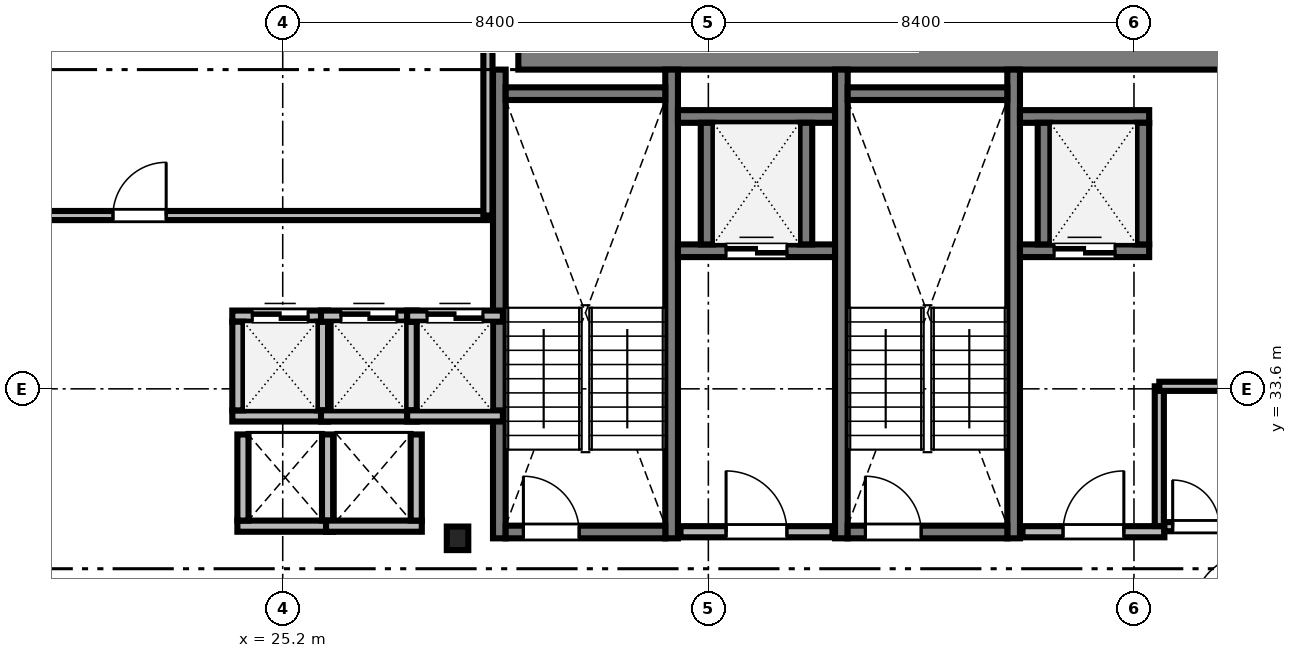
"""IFC4 building model, lengths in metres.
Left out: names, types, materials, properties, quantities, classifications, styles, units other than length and angle.
Written with IfcOpenShell. Run it as: python <this file> out.ifc"""

import sys

from ifc_helpers import new_model, si_unit, direction, frame, frame_2d, origin, origin_2d, place, context, subcontext, project, spatial, rectangle, i_section, extrude, source, transform, mapped, element, fill, save


model = new_model("IFC4")
c1 = context("Model", 3, precision=1e-05, world=origin(), true_north=direction((0.0, 1.0)))
c2 = subcontext(c1, "Body", "Model", "MODEL_VIEW")
j1 = project(units=[si_unit("LENGTHUNIT", "METRE"), si_unit("PLANEANGLEUNIT", "RADIAN")], contexts=[c1])
p1 = place(None, origin())
s1 = spatial("IfcSite", under=j1, at=p1, CompositionType="ELEMENT")
p2 = place(p1, origin())
s2 = spatial("IfcBuilding", under=s1, at=p2, CompositionType="ELEMENT")
p3 = place(p2, frame((0.0, 0.0, 129.8)))
s3 = spatial("IfcBuildingStorey", under=s2, at=p3, CompositionType="ELEMENT", Elevation=129.8)
m1 = source(origin(), c2, "Body", "SweptSolid", [
    extrude(rectangle(XDim=17.52, YDim=0.8, at=frame_2d((8.76, 0.0))), origin(), (0.0, 0.0, 1.0), 3.46),
])
p4 = place(p3, frame((29.85, 40.3, 0.0), z_axis=(0.0, 0.0, 1.0), x_axis=(1.0, 0.0, 0.0)))
e1 = element("IfcWall", 1, at=p4, inside=s3, PredefinedType="SHEAR", context=c2, shape_type="MappedRepresentation", body=[
    mapped(m1, transform((0.0, 0.0, 0.0), scale=1.0)),
])
m2 = source(origin(), c2, "Body", "SweptSolid", [
    extrude(i_section(OverallWidth=0.424, OverallDepth=0.465, WebThickness=0.035, FlangeThickness=0.056, FilletRadius=0.015, at=origin_2d()), origin(), (0.0, 0.0, 1.0), 3.46),
])
p5 = place(p3, frame((28.65, 30.65, 0.0), z_axis=(0.0, 0.0, 1.0), x_axis=(1.0, 0.0, 0.0)))
e2 = element("IfcColumn", 2, at=p5, inside=s3, PredefinedType="COLUMN", context=c2, shape_type="MappedRepresentation", body=[
    mapped(m2, transform((0.0, 0.0, 0.0), scale=1.0)),
])
m3 = source(origin(), c2, "Body", "SweptSolid", [
    extrude(rectangle(XDim=9.25, YDim=0.25, at=frame_2d((4.625, 0.0))), origin(), (0.0, 0.0, 1.0), 3.5),
])
for number, where, z_axis, x_axis in (
    (3, (29.475, 30.65, 0.0), (0.0, 0.0, 1.0), (0.0, 1.0, 0.0)),
    (4, (32.875, 30.65, 0.0), (0.0, 0.0, 1.0), (0.0, 1.0, 0.0)),
):
    element("IfcWall", number, at=place(p3, frame(where, z_axis=z_axis, x_axis=x_axis)), inside=s3, PredefinedType="SOLIDWALL", context=c2, shape_type="MappedRepresentation", body=[
        mapped(m3, transform((0.0, 0.0, 0.0), scale=1.0)),
    ])
m4 = source(origin(), c2, "Body", "SweptSolid", [
    extrude(rectangle(XDim=3.15, YDim=0.25, at=frame_2d((1.575, 0.0))), origin(), (0.0, 0.0, 1.0), 3.5),
])
p6 = place(p3, frame((29.6, 39.425, 0.0), z_axis=(0.0, 0.0, 1.0), x_axis=(1.0, 0.0, 0.0)))
e5 = element("IfcWall", 5, at=p6, inside=s3, PredefinedType="SOLIDWALL", context=c2, shape_type="MappedRepresentation", body=[
    mapped(m4, transform((0.0, 0.0, 0.0), scale=1.0)),
])
p7 = place(p3, frame((29.6, 30.775, 0.0), z_axis=(0.0, 0.0, 1.0), x_axis=(1.0, 0.0, 0.0)))
e6 = element("IfcWall", 6, at=p7, inside=s3, PredefinedType="SOLIDWALL", context=c2, shape_type="MappedRepresentation", body=[
    mapped(m4, transform((0.0, 0.0, 0.0), scale=1.0)),
])
m5 = source(origin(), c2, "Body", "SweptSolid", [
    extrude(rectangle(XDim=1.1, YDim=2.2, at=frame_2d((0.55, 1.1))), frame((0.0, 0.135, 0.0), z_axis=(0.0, -1.0, 0.0), x_axis=(1.0, 0.0, 0.0)), (0.0, 0.0, 1.0), 0.27),
])
p8 = place(p7, frame((0.35, 0.0, 0.0)))
e7 = element("IfcOpeningElement", 7, at=p8, cuts=e6, PredefinedType="OPENING", context=c2, shape_type="MappedRepresentation", body=[
    mapped(m5, transform((0.0, 0.0, 0.0), scale=1.0)),
])
for number, where, z_axis, x_axis in (
    (8, (36.225, 30.65, 0.0), (0.0, 0.0, 1.0), (0.0, 1.0, 0.0)),
    (9, (39.625, 30.65, 0.0), (0.0, 0.0, 1.0), (0.0, 1.0, 0.0)),
):
    element("IfcWall", number, at=place(p3, frame(where, z_axis=z_axis, x_axis=x_axis)), inside=s3, PredefinedType="SOLIDWALL", context=c2, shape_type="MappedRepresentation", body=[
        mapped(m3, transform((0.0, 0.0, 0.0), scale=1.0)),
    ])
p9 = place(p3, frame((36.35, 39.425, 0.0), z_axis=(0.0, 0.0, 1.0), x_axis=(1.0, 0.0, 0.0)))
e10 = element("IfcWall", 10, at=p9, inside=s3, PredefinedType="SOLIDWALL", context=c2, shape_type="MappedRepresentation", body=[
    mapped(m4, transform((0.0, 0.0, 0.0), scale=1.0)),
])
p10 = place(p3, frame((36.35, 30.775, 0.0), z_axis=(0.0, 0.0, 1.0), x_axis=(1.0, 0.0, 0.0)))
e11 = element("IfcWall", 11, at=p10, inside=s3, PredefinedType="SOLIDWALL", context=c2, shape_type="MappedRepresentation", body=[
    mapped(m4, transform((0.0, 0.0, 0.0), scale=1.0)),
])
p11 = place(p10, frame((0.35, 0.0, 0.0)))
e12 = element("IfcOpeningElement", 12, at=p11, cuts=e11, PredefinedType="OPENING", context=c2, shape_type="MappedRepresentation", body=[
    mapped(m5, transform((0.0, 0.0, 0.0), scale=1.0)),
])
m6 = source(origin(), c2, "Body", "SweptSolid", [
    extrude(rectangle(XDim=3.0, YDim=0.22, at=frame_2d((1.5, 0.0))), origin(), (0.0, 0.0, 1.0), 3.46),
])
p12 = place(p3, frame((33.05, 30.78, 0.0), z_axis=(0.0, 0.0, 1.0), x_axis=(1.0, 0.0, 0.0)))
e13 = element("IfcWall", 13, at=p12, inside=s3, PredefinedType="SOLIDWALL", context=c2, shape_type="MappedRepresentation", body=[
    mapped(m6, transform((0.0, 0.0, 0.0), scale=1.0)),
])
m7 = source(origin(), c2, "Body", "SweptSolid", [
    extrude(rectangle(XDim=1.2, YDim=2.2, at=frame_2d((0.6, 1.1))), frame((0.0, 0.12, 0.0), z_axis=(0.0, -1.0, 0.0), x_axis=(1.0, 0.0, 0.0)), (0.0, 0.0, 1.0), 0.24),
])
p13 = place(p12, frame((0.9, 0.0, 0.0)))
e14 = element("IfcOpeningElement", 14, at=p13, cuts=e13, PredefinedType="OPENING", context=c2, shape_type="MappedRepresentation", body=[
    mapped(m7, transform((0.0, 0.0, 0.0), scale=1.0)),
])
m8 = source(origin(), c2, "Body", "SweptSolid", [
    extrude(rectangle(XDim=2.8, YDim=0.22, at=frame_2d((1.4, 0.0))), origin(), (0.0, 0.0, 1.0), 3.46),
])
p14 = place(p3, frame((39.8, 30.78, 0.0), z_axis=(0.0, 0.0, 1.0), x_axis=(1.0, 0.0, 0.0)))
e15 = element("IfcWall", 15, at=p14, inside=s3, PredefinedType="SOLIDWALL", context=c2, shape_type="MappedRepresentation", body=[
    mapped(m8, transform((0.0, 0.0, 0.0), scale=1.0)),
])
p15 = place(p14, frame((0.8, 0.0, 0.0)))
e16 = element("IfcOpeningElement", 16, at=p15, cuts=e15, PredefinedType="OPENING", context=c2, shape_type="MappedRepresentation", body=[
    mapped(m7, transform((0.0, 0.0, 0.0), scale=1.0)),
])
m9 = source(origin(), c2, "Body", "SweptSolid", [
    extrude(rectangle(XDim=1.89, YDim=0.22, at=frame_2d((0.945, 0.0))), origin(), (0.0, 0.0, 1.0), 3.46),
])
p16 = place(p3, frame((24.205, 33.065, 0.0), z_axis=(0.0, 0.0, 1.0), x_axis=(1.0, 0.0, 0.0)))
e17 = element("IfcWall", 17, at=p16, inside=s3, PredefinedType="SOLIDWALL", context=c2, shape_type="MappedRepresentation", body=[
    mapped(m9, transform((0.0, 0.0, 0.0), scale=1.0)),
])
p17 = place(p3, frame((24.205, 35.035, 0.0), z_axis=(0.0, 0.0, 1.0), x_axis=(1.0, 0.0, 0.0)))
e18 = element("IfcWall", 18, at=p17, inside=s3, PredefinedType="SOLIDWALL", context=c2, shape_type="MappedRepresentation", body=[
    mapped(m9, transform((0.0, 0.0, 0.0), scale=1.0)),
])
m10 = source(origin(), c2, "Body", "SweptSolid", [
    extrude(rectangle(XDim=1.1, YDim=2.2, at=frame_2d((0.55, 1.1))), frame((0.0, 0.12, 0.0), z_axis=(0.0, -1.0, 0.0), x_axis=(1.0, 0.0, 0.0)), (0.0, 0.0, 1.0), 0.24),
])
p18 = place(p17, frame((0.395, 0.0, 0.0)))
e19 = element("IfcOpeningElement", 19, at=p18, cuts=e18, PredefinedType="OPENING", context=c2, shape_type="MappedRepresentation", body=[
    mapped(m10, transform((0.0, 0.0, 0.0), scale=1.0)),
])
m11 = source(origin(), c2, "Body", "SweptSolid", [
    extrude(rectangle(XDim=1.75, YDim=0.22, at=frame_2d((0.875, 0.0))), origin(), (0.0, 0.0, 1.0), 3.46),
])
for number, where, z_axis, x_axis in (
    (20, (24.315, 33.175, 0.0), (0.0, 0.0, 1.0), (0.0, 1.0, 0.0)),
    (21, (25.985, 33.175, 0.0), (0.0, 0.0, 1.0), (0.0, 1.0, 0.0)),
):
    element("IfcWall", number, at=place(p3, frame(where, z_axis=z_axis, x_axis=x_axis)), inside=s3, PredefinedType="SOLIDWALL", context=c2, shape_type="MappedRepresentation", body=[
        mapped(m11, transform((0.0, 0.0, 0.0), scale=1.0)),
    ])
p19 = place(p3, frame((25.955, 33.065, 0.0), z_axis=(0.0, 0.0, 1.0), x_axis=(1.0, 0.0, 0.0)))
e22 = element("IfcWall", 22, at=p19, inside=s3, PredefinedType="SOLIDWALL", context=c2, shape_type="MappedRepresentation", body=[
    mapped(m9, transform((0.0, 0.0, 0.0), scale=1.0)),
])
p20 = place(p3, frame((25.955, 35.035, 0.0), z_axis=(0.0, 0.0, 1.0), x_axis=(1.0, 0.0, 0.0)))
e23 = element("IfcWall", 23, at=p20, inside=s3, PredefinedType="SOLIDWALL", context=c2, shape_type="MappedRepresentation", body=[
    mapped(m9, transform((0.0, 0.0, 0.0), scale=1.0)),
])
p21 = place(p20, frame((0.395, 0.0, 0.0)))
e24 = element("IfcOpeningElement", 24, at=p21, cuts=e23, PredefinedType="OPENING", context=c2, shape_type="MappedRepresentation", body=[
    mapped(m10, transform((0.0, 0.0, 0.0), scale=1.0)),
])
p22 = place(p3, frame((27.735, 33.175, 0.0), z_axis=(0.0, 0.0, 1.0), x_axis=(0.0, 1.0, 0.0)))
e25 = element("IfcWall", 25, at=p22, inside=s3, PredefinedType="SOLIDWALL", context=c2, shape_type="MappedRepresentation", body=[
    mapped(m11, transform((0.0, 0.0, 0.0), scale=1.0)),
])
p23 = place(p3, frame((27.655, 33.065, 0.0), z_axis=(0.0, 0.0, 1.0), x_axis=(1.0, 0.0, 0.0)))
e26 = element("IfcWall", 26, at=p23, inside=s3, PredefinedType="SOLIDWALL", context=c2, shape_type="MappedRepresentation", body=[
    mapped(m9, transform((0.0, 0.0, 0.0), scale=1.0)),
])
p24 = place(p3, frame((27.655, 35.035, 0.0), z_axis=(0.0, 0.0, 1.0), x_axis=(1.0, 0.0, 0.0)))
e27 = element("IfcWall", 27, at=p24, inside=s3, PredefinedType="SOLIDWALL", context=c2, shape_type="MappedRepresentation", body=[
    mapped(m9, transform((0.0, 0.0, 0.0), scale=1.0)),
])
p25 = place(p24, frame((0.395, 0.0, 0.0)))
e28 = element("IfcOpeningElement", 28, at=p25, cuts=e27, PredefinedType="OPENING", context=c2, shape_type="MappedRepresentation", body=[
    mapped(m10, transform((0.0, 0.0, 0.0), scale=1.0)),
])
m12 = source(origin(), c2, "Body", "SweptSolid", [
    extrude(rectangle(XDim=3.1, YDim=0.25, at=frame_2d((1.55, 0.0))), origin(), (0.0, 0.0, 1.0), 3.46),
])
p26 = place(p3, frame((33.0, 36.325, 0.0), z_axis=(0.0, 0.0, 1.0), x_axis=(1.0, 0.0, 0.0)))
e29 = element("IfcWall", 29, at=p26, inside=s3, PredefinedType="SOLIDWALL", context=c2, shape_type="MappedRepresentation", body=[
    mapped(m12, transform((0.0, 0.0, 0.0), scale=1.0)),
])
m13 = source(origin(), c2, "Body", "SweptSolid", [
    extrude(rectangle(XDim=1.2, YDim=2.25, at=frame_2d((0.6, 1.125))), frame((0.0, 0.135, 0.0), z_axis=(0.0, -1.0, 0.0), x_axis=(1.0, 0.0, 0.0)), (0.0, 0.0, 1.0), 0.27),
])
p27 = place(p26, frame((0.95, 0.0, 0.0)))
e30 = element("IfcOpeningElement", 30, at=p27, cuts=e29, PredefinedType="OPENING", context=c2, shape_type="MappedRepresentation", body=[
    mapped(m13, transform((0.0, 0.0, 0.0), scale=1.0)),
])
p28 = place(p3, frame((33.0, 38.975, 0.0), z_axis=(0.0, 0.0, 1.0), x_axis=(1.0, 0.0, 0.0)))
e31 = element("IfcWall", 31, at=p28, inside=s3, PredefinedType="SOLIDWALL", context=c2, shape_type="MappedRepresentation", body=[
    mapped(m12, transform((0.0, 0.0, 0.0), scale=1.0)),
])
m14 = source(origin(), c2, "Body", "SweptSolid", [
    extrude(rectangle(XDim=2.4, YDim=0.25, at=frame_2d((1.2, 0.0))), origin(), (0.0, 0.0, 1.0), 3.46),
])
for number, where, z_axis, x_axis in (
    (32, (33.575, 36.45, 0.0), (0.0, 0.0, 1.0), (0.0, 1.0, 0.0)),
    (33, (35.525, 36.45, 0.0), (0.0, 0.0, 1.0), (0.0, 1.0, 0.0)),
):
    element("IfcWall", number, at=place(p3, frame(where, z_axis=z_axis, x_axis=x_axis)), inside=s3, PredefinedType="SOLIDWALL", context=c2, shape_type="MappedRepresentation", body=[
        mapped(m14, transform((0.0, 0.0, 0.0), scale=1.0)),
    ])
m15 = source(origin(), c2, "Body", "SweptSolid", [
    extrude(rectangle(XDim=2.55, YDim=0.25, at=frame_2d((1.275, 0.0))), origin(), (0.0, 0.0, 1.0), 3.46),
])
p29 = place(p3, frame((39.75, 36.325, 0.0), z_axis=(0.0, 0.0, 1.0), x_axis=(1.0, 0.0, 0.0)))
e34 = element("IfcWall", 34, at=p29, inside=s3, PredefinedType="SOLIDWALL", context=c2, shape_type="MappedRepresentation", body=[
    mapped(m15, transform((0.0, 0.0, 0.0), scale=1.0)),
])
p30 = place(p29, frame((0.675, 0.0, 0.0)))
e35 = element("IfcOpeningElement", 35, at=p30, cuts=e34, PredefinedType="OPENING", context=c2, shape_type="MappedRepresentation", body=[
    mapped(m13, transform((0.0, 0.0, 0.0), scale=1.0)),
])
p31 = place(p3, frame((39.75, 38.975, 0.0), z_axis=(0.0, 0.0, 1.0), x_axis=(1.0, 0.0, 0.0)))
e36 = element("IfcWall", 36, at=p31, inside=s3, PredefinedType="SOLIDWALL", context=c2, shape_type="MappedRepresentation", body=[
    mapped(m15, transform((0.0, 0.0, 0.0), scale=1.0)),
])
for number, where, z_axis, x_axis in (
    (37, (40.225, 36.45, 0.0), (0.0, 0.0, 1.0), (0.0, 1.0, 0.0)),
    (38, (42.175, 36.45, 0.0), (0.0, 0.0, 1.0), (0.0, 1.0, 0.0)),
):
    element("IfcWall", number, at=place(p3, frame(where, z_axis=z_axis, x_axis=x_axis)), inside=s3, PredefinedType="SOLIDWALL", context=c2, shape_type="MappedRepresentation", body=[
        mapped(m14, transform((0.0, 0.0, 0.0), scale=1.0)),
    ])
m16 = source(origin(), c2, "Body", "SweptSolid", [
    extrude(rectangle(XDim=1.89, YDim=0.22, at=frame_2d((0.945, 0.0))), origin(), (0.0, 0.0, 1.0), 3.46),
])
p32 = place(p3, frame((24.305, 30.89, 0.0), z_axis=(0.0, 0.0, 1.0), x_axis=(1.0, 0.0, 0.0)))
e39 = element("IfcWall", 39, at=p32, inside=s3, PredefinedType="SOLIDWALL", context=c2, shape_type="MappedRepresentation", body=[
    mapped(m16, transform((0.0, 0.0, 0.0), scale=1.0)),
])
m17 = source(origin(), c2, "Body", "SweptSolid", [
    extrude(rectangle(XDim=1.7, YDim=0.22, at=frame_2d((0.85, 0.0))), origin(), (0.0, 0.0, 1.0), 3.46),
])
for number, where, z_axis, x_axis in (
    (40, (24.415, 31.0, 0.0), (0.0, 0.0, 1.0), (0.0, 1.0, 0.0)),
    (41, (26.085, 31.0, 0.0), (0.0, 0.0, 1.0), (0.0, 1.0, 0.0)),
):
    element("IfcWall", number, at=place(p3, frame(where, z_axis=z_axis, x_axis=x_axis)), inside=s3, PredefinedType="SOLIDWALL", context=c2, shape_type="MappedRepresentation", body=[
        mapped(m17, transform((0.0, 0.0, 0.0), scale=1.0)),
    ])
p33 = place(p3, frame((26.055, 30.89, 0.0), z_axis=(0.0, 0.0, 1.0), x_axis=(1.0, 0.0, 0.0)))
e42 = element("IfcWall", 42, at=p33, inside=s3, PredefinedType="SOLIDWALL", context=c2, shape_type="MappedRepresentation", body=[
    mapped(m16, transform((0.0, 0.0, 0.0), scale=1.0)),
])
p34 = place(p3, frame((27.835, 31.0, 0.0), z_axis=(0.0, 0.0, 1.0), x_axis=(0.0, 1.0, 0.0)))
e43 = element("IfcWall", 43, at=p34, inside=s3, PredefinedType="SOLIDWALL", context=c2, shape_type="MappedRepresentation", body=[
    mapped(m17, transform((0.0, 0.0, 0.0), scale=1.0)),
])
m18 = source(origin(), c2, "Body", "SweptSolid", [
    extrude(rectangle(XDim=22.328, YDim=0.18, at=frame_2d((11.164, 0.0))), origin(), (0.0, 0.0, 1.0), 2.702),
])
p35 = place(p3, frame((6.922, 37.02, 0.0), z_axis=(0.0, 0.0, 1.0), x_axis=(1.0, 0.0, 0.0)))
e44 = element("IfcWall", 44, at=p35, inside=s3, PredefinedType="PARTITIONING", context=c2, shape_type="MappedRepresentation", body=[
    mapped(m18, transform((0.0, 0.0, 0.0), scale=1.0)),
])
m19 = source(origin(), c2, "Body", "SweptSolid", [
    extrude(rectangle(XDim=1.05, YDim=2.2, at=frame_2d((0.525, 1.1))), frame((0.0, 0.1, 0.0), z_axis=(0.0, -1.0, 0.0), x_axis=(1.0, 0.0, 0.0)), (0.0, 0.0, 1.0), 0.2),
])
p36 = place(p35, frame((14.928, 0.0, 0.0)))
e45 = element("IfcOpeningElement", 45, at=p36, cuts=e44, PredefinedType="OPENING", context=c2, shape_type="MappedRepresentation", body=[
    mapped(m19, transform((0.0, 0.0, 0.0), scale=1.0)),
])
m20 = source(origin(), c2, "Body", "SweptSolid", [
    extrude(rectangle(XDim=1.248, YDim=0.18, at=frame_2d((0.624, 0.0))), origin(), (0.0, 0.0, 1.0), 3.46),
])
p37 = place(p3, frame((42.6, 30.88, 0.0), z_axis=(0.0, 0.0, 1.0), x_axis=(1.0, 0.0, 0.0)))
e46 = element("IfcWall", 46, at=p37, inside=s3, PredefinedType="PARTITIONING", context=c2, shape_type="MappedRepresentation", body=[
    mapped(m20, transform((0.0, 0.0, 0.0), scale=1.0)),
])
m21 = source(origin(), c2, "Body", "SweptSolid", [
    extrude(rectangle(XDim=0.92, YDim=2.1, at=frame_2d((0.46, 1.05))), frame((0.0, 0.1, 0.0), z_axis=(0.0, -1.0, 0.0), x_axis=(1.0, 0.0, 0.0)), (0.0, 0.0, 1.0), 0.2),
])
p38 = place(p37, frame((0.164, 0.0, 0.0)))
e47 = element("IfcOpeningElement", 47, at=p38, cuts=e46, PredefinedType="OPENING", context=c2, shape_type="MappedRepresentation", body=[
    mapped(m21, transform((0.0, 0.0, 0.0), scale=1.0)),
])
m22 = source(origin(), c2, "Body", "SweptSolid", [
    extrude(rectangle(XDim=11.45, YDim=0.18, at=frame_2d((5.725, 0.0))), origin(), (0.0, 0.0, 1.0), 2.702),
])
p39 = place(p3, frame((29.25, 37.02, 0.0), z_axis=(0.0, 0.0, 1.0), x_axis=(0.0, 1.0, 0.0)))
e48 = element("IfcWall", 48, at=p39, inside=s3, PredefinedType="PARTITIONING", context=c2, shape_type="MappedRepresentation", body=[
    mapped(m22, transform((0.0, 0.0, 0.0), scale=1.0)),
])
m23 = source(origin(), c2, "Body", "SweptSolid", [
    extrude(rectangle(XDim=2.758, YDim=0.18, at=frame_2d((1.379, 0.0))), origin(), (0.0, 0.0, 1.0), 3.46),
])
p40 = place(p3, frame((42.5, 30.892, 0.0), z_axis=(0.0, 0.0, 1.0), x_axis=(0.0, 1.0, 0.0)))
e49 = element("IfcWall", 49, at=p40, inside=s3, PredefinedType="PARTITIONING", context=c2, shape_type="MappedRepresentation", body=[
    mapped(m23, transform((0.0, 0.0, 0.0), scale=1.0)),
])
m24 = source(origin(), c2, "Body", "SweptSolid", [
    extrude(rectangle(XDim=1.348, YDim=0.18, at=frame_2d((0.674, 0.0))), origin(), (0.0, 0.0, 1.0), 3.46),
])
p41 = place(p3, frame((42.5, 33.65, 0.0), z_axis=(0.0, 0.0, 1.0), x_axis=(1.0, 0.0, 0.0)))
e50 = element("IfcWall", 50, at=p41, inside=s3, PredefinedType="PARTITIONING", context=c2, shape_type="MappedRepresentation", body=[
    mapped(m24, transform((0.0, 0.0, 0.0), scale=1.0)),
])
m25 = source(origin(), c2, "Body", "SweptSolid", [
    extrude(rectangle(XDim=1.1, YDim=2.2, at=frame_2d((0.55, 1.1))), frame((0.0, 0.025, 0.0), z_axis=(0.0, -1.0, 0.0), x_axis=(1.0, 0.0, 0.0)), (0.0, 0.0, 1.0), 0.05),
])
p42 = place(p8, origin())
e51 = element("IfcDoor", 51, at=p42, inside=s3, OperationType="SINGLE_SWING_LEFT", PredefinedType="DOOR", context=c2, shape_type="MappedRepresentation", body=[
    mapped(m25, transform((0.0, 0.0, 0.0), scale=1.0)),
])
fill(e7, e51)
p43 = place(p11, origin())
e52 = element("IfcDoor", 52, at=p43, inside=s3, OperationType="SINGLE_SWING_LEFT", PredefinedType="DOOR", context=c2, shape_type="MappedRepresentation", body=[
    mapped(m25, transform((0.0, 0.0, 0.0), scale=1.0)),
])
fill(e12, e52)
m26 = source(origin(), c2, "Body", "SweptSolid", [
    extrude(rectangle(XDim=1.2, YDim=2.2, at=frame_2d((0.6, 1.1))), frame((0.0, 0.025, 0.0), z_axis=(0.0, -1.0, 0.0), x_axis=(1.0, 0.0, 0.0)), (0.0, 0.0, 1.0), 0.05),
])
p44 = place(p13, origin())
e53 = element("IfcDoor", 53, at=p44, inside=s3, OperationType="SINGLE_SWING_LEFT", PredefinedType="DOOR", context=c2, shape_type="MappedRepresentation", body=[
    mapped(m26, transform((0.0, 0.0, 0.0), scale=1.0)),
])
fill(e14, e53)
p45 = place(p15, origin())
e54 = element("IfcDoor", 54, at=p45, inside=s3, OperationType="SINGLE_SWING_RIGHT", PredefinedType="DOOR", context=c2, shape_type="MappedRepresentation", body=[
    mapped(m26, transform((0.0, 0.0, 0.0), scale=1.0)),
])
fill(e16, e54)
p46 = place(p18, origin())
e55 = element("IfcDoor", 55, at=p46, inside=s3, OperationType="DOUBLE_DOOR_SLIDING", PredefinedType="DOOR", context=c2, shape_type="MappedRepresentation", body=[
    mapped(m25, transform((0.0, 0.0, 0.0), scale=1.0)),
])
fill(e19, e55)
p47 = place(p21, origin())
e56 = element("IfcDoor", 56, at=p47, inside=s3, OperationType="DOUBLE_DOOR_SLIDING", PredefinedType="DOOR", context=c2, shape_type="MappedRepresentation", body=[
    mapped(m25, transform((0.0, 0.0, 0.0), scale=1.0)),
])
fill(e24, e56)
p48 = place(p25, origin())
e57 = element("IfcDoor", 57, at=p48, inside=s3, OperationType="DOUBLE_DOOR_SLIDING", PredefinedType="DOOR", context=c2, shape_type="MappedRepresentation", body=[
    mapped(m25, transform((0.0, 0.0, 0.0), scale=1.0)),
])
fill(e28, e57)
m27 = source(origin(), c2, "Body", "SweptSolid", [
    extrude(rectangle(XDim=1.2, YDim=2.25, at=frame_2d((0.6, 1.125))), frame((0.0, 0.025, 0.0), z_axis=(0.0, -1.0, 0.0), x_axis=(1.0, 0.0, 0.0)), (0.0, 0.0, 1.0), 0.05),
])
p49 = place(p27, origin())
e58 = element("IfcDoor", 58, at=p49, inside=s3, OperationType="DOUBLE_DOOR_SLIDING", PredefinedType="DOOR", context=c2, shape_type="MappedRepresentation", body=[
    mapped(m27, transform((0.0, 0.0, 0.0), scale=1.0)),
])
fill(e30, e58)
p50 = place(p30, origin())
e59 = element("IfcDoor", 59, at=p50, inside=s3, OperationType="DOUBLE_DOOR_SLIDING", PredefinedType="DOOR", context=c2, shape_type="MappedRepresentation", body=[
    mapped(m27, transform((0.0, 0.0, 0.0), scale=1.0)),
])
fill(e35, e59)
m28 = source(origin(), c2, "Body", "SweptSolid", [
    extrude(rectangle(XDim=1.05, YDim=2.2, at=frame_2d((0.525, 1.1))), frame((0.0, 0.025, 0.0), z_axis=(0.0, -1.0, 0.0), x_axis=(1.0, 0.0, 0.0)), (0.0, 0.0, 1.0), 0.05),
])
p51 = place(p36, origin())
e60 = element("IfcDoor", 60, at=p51, inside=s3, OperationType="SINGLE_SWING_RIGHT", PredefinedType="DOOR", context=c2, shape_type="MappedRepresentation", body=[
    mapped(m28, transform((0.0, 0.0, 0.0), scale=1.0)),
])
fill(e45, e60)
m29 = source(origin(), c2, "Body", "SweptSolid", [
    extrude(rectangle(XDim=0.92, YDim=2.1, at=frame_2d((0.46, 1.05))), frame((0.0, 0.025, 0.0), z_axis=(0.0, -1.0, 0.0), x_axis=(1.0, 0.0, 0.0)), (0.0, 0.0, 1.0), 0.05),
])
p52 = place(p38, origin())
e61 = element("IfcDoor", 61, at=p52, inside=s3, OperationType="SINGLE_SWING_LEFT", PredefinedType="DOOR", context=c2, shape_type="MappedRepresentation", body=[
    mapped(m29, transform((0.0, 0.0, 0.0), scale=1.0)),
])
fill(e47, e61)
save(model, sys.argv[1])
